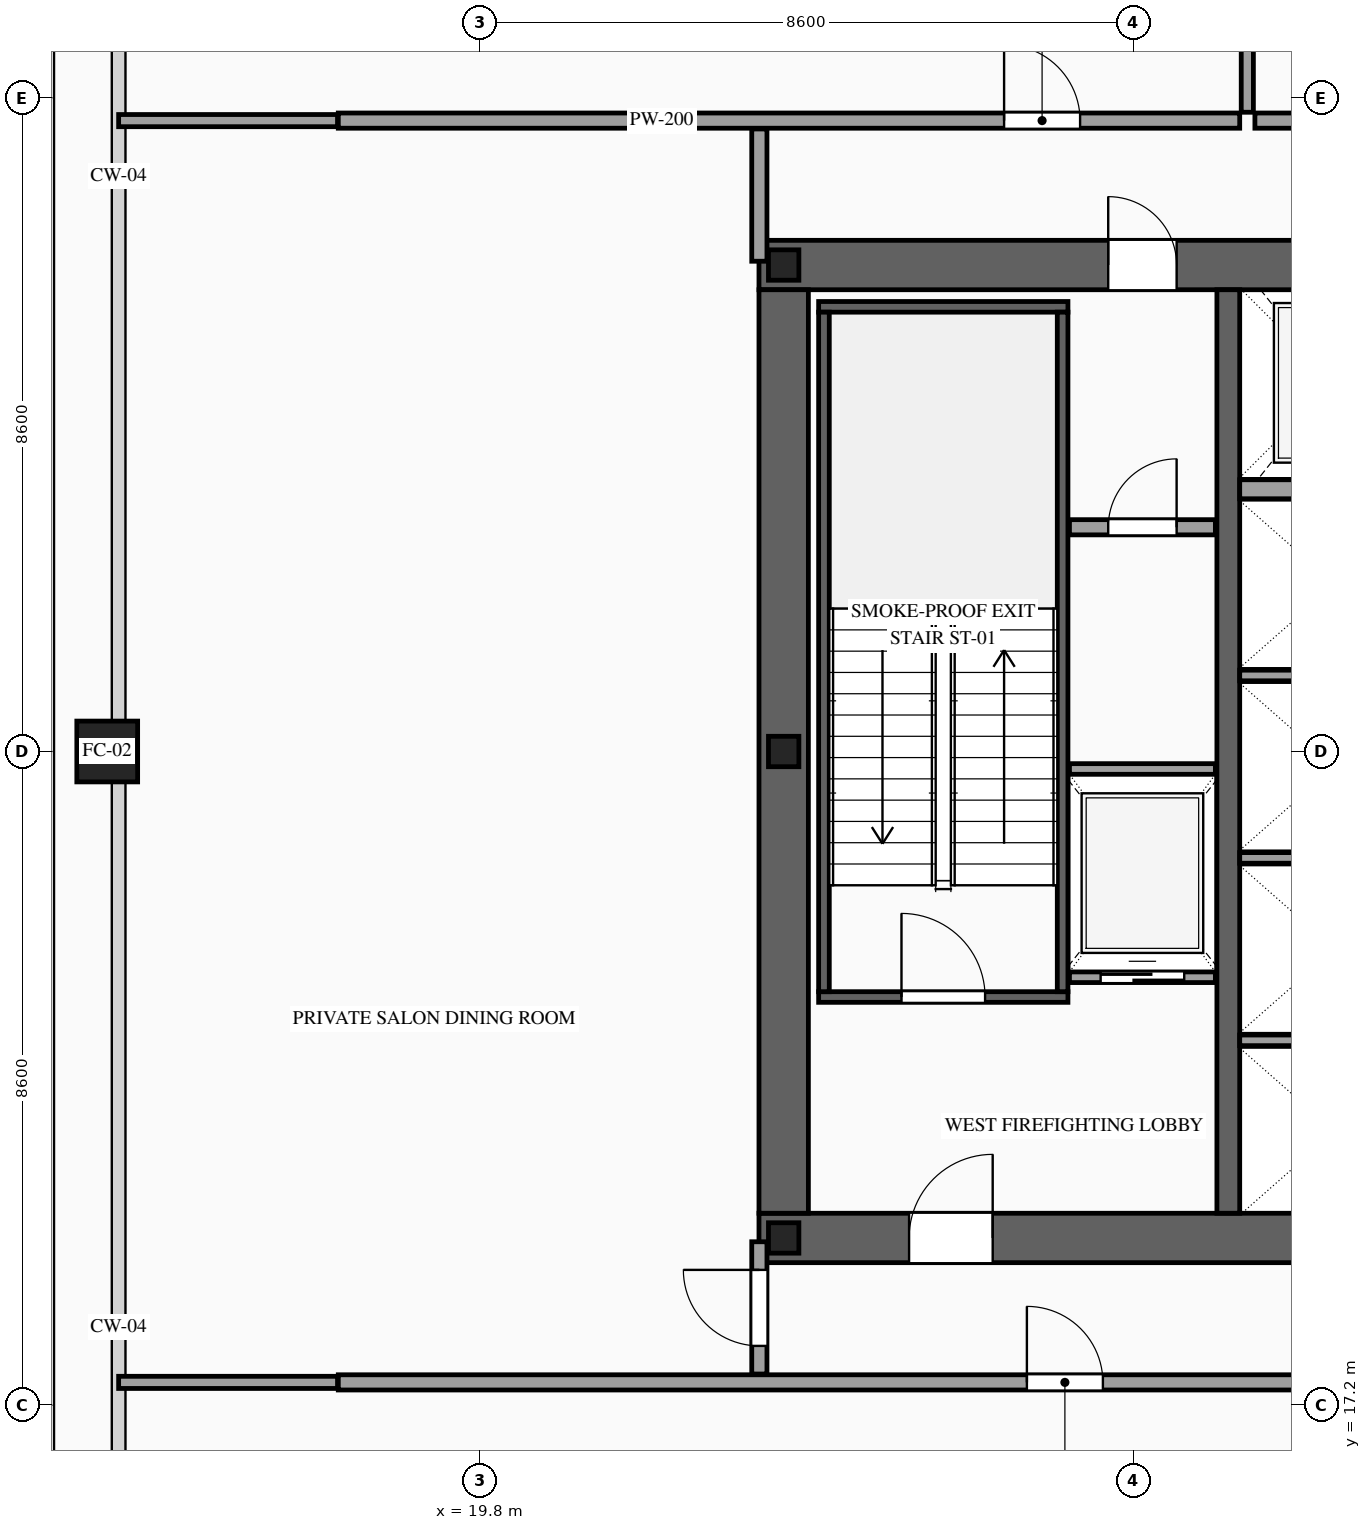
"""IFC4 building model, lengths in metres.
Left out: names, types, materials, properties, quantities, classifications, styles, units other than length and angle.
Written with IfcOpenShell. Run it as: python <this file> out.ifc"""

import sys

from ifc_helpers import new_model, si_unit, direction, frame, frame_2d, origin, origin_2d, place, context, subcontext, project, spatial, rectangle, hollow_rectangle, i_section, extrude, source, transform, mapped, element, fill, save


model = new_model("IFC4")
c1 = context("Model", 3, precision=1e-05, world=origin(), true_north=direction((0.0, 1.0)))
c2 = subcontext(c1, "Body", "Model", "MODEL_VIEW")
j1 = project(units=[si_unit("LENGTHUNIT", "METRE"), si_unit("PLANEANGLEUNIT", "RADIAN")], contexts=[c1])
p1 = place(None, origin())
s1 = spatial("IfcSite", under=j1, at=p1, CompositionType="ELEMENT")
p2 = place(p1, origin())
s2 = spatial("IfcBuilding", under=s1, at=p2, CompositionType="ELEMENT")
p3 = place(p2, frame((0.0, 0.0, 171.6)))
s3 = spatial("IfcBuildingStorey", under=s2, at=p3, CompositionType="ELEMENT", Elevation=171.6)
p4 = place(p3, frame((23.475, 19.4, 0.0), z_axis=(0.0, 0.0, 1.0), x_axis=(1.0, 0.0, 0.0)))
e1 = element("IfcWall", 1, at=p4, inside=s3, PredefinedType="SHEAR", context=c2, shape_type="SweptSolid", body=[
    extrude(rectangle(XDim=27.05, YDim=0.65, at=frame_2d((13.525, 0.0))), origin(), (0.0, 0.0, 1.0), 4.8),
])
p5 = place(p4, frame((1.975, 0.0, 0.0)))
e2 = element("IfcOpeningElement", 2, at=p5, cuts=e1, PredefinedType="OPENING", context=c2, shape_type="SweptSolid", body=[
    extrude(rectangle(XDim=1.1, YDim=2.2, at=frame_2d((0.55, 1.1))), frame((0.0, 0.34, 0.0), z_axis=(0.0, -1.0, 0.0), x_axis=(1.0, 0.0, 0.0)), (0.0, 0.0, 1.0), 0.68),
])
p6 = place(p4, frame((9.875, 0.0, 0.0)))
e3 = element("IfcOpeningElement", 3, at=p6, cuts=e1, PredefinedType="OPENING", context=c2, shape_type="SweptSolid", body=[
    extrude(rectangle(XDim=1.1, YDim=2.2, at=frame_2d((0.55, 1.1))), frame((0.0, 0.34, 0.0), z_axis=(0.0, -1.0, 0.0), x_axis=(1.0, 0.0, 0.0)), (0.0, 0.0, 1.0), 0.68),
])
p7 = place(p4, frame((23.075, 0.0, 0.0)))
e4 = element("IfcOpeningElement", 4, at=p7, cuts=e1, PredefinedType="OPENING", context=c2, shape_type="SweptSolid", body=[
    extrude(rectangle(XDim=1.1, YDim=2.2, at=frame_2d((0.55, 1.1))), frame((0.0, 0.34, 0.0), z_axis=(0.0, -1.0, 0.0), x_axis=(1.0, 0.0, 0.0)), (0.0, 0.0, 1.0), 0.68),
])
p8 = place(p4, frame((19.695, 0.0, 0.0)))
e5 = element("IfcOpeningElement", 5, at=p8, cuts=e1, PredefinedType="OPENING", context=c2, shape_type="SweptSolid", body=[
    extrude(rectangle(XDim=0.9, YDim=2.15, at=frame_2d((0.45, 1.075))), frame((0.0, 0.34, 0.0), z_axis=(0.0, -1.0, 0.0), x_axis=(1.0, 0.0, 0.0)), (0.0, 0.0, 1.0), 0.68),
])
p9 = place(p4, frame((18.255, 0.0, 0.0)))
e6 = element("IfcOpeningElement", 6, at=p9, cuts=e1, PredefinedType="OPENING", context=c2, shape_type="SweptSolid", body=[
    extrude(rectangle(XDim=0.9, YDim=2.15, at=frame_2d((0.45, 1.075))), frame((0.0, 0.34, 0.0), z_axis=(0.0, -1.0, 0.0), x_axis=(1.0, 0.0, 0.0)), (0.0, 0.0, 1.0), 0.68),
])
p10 = place(p3, frame((23.475, 32.2, 0.0), z_axis=(0.0, 0.0, 1.0), x_axis=(1.0, 0.0, 0.0)))
e7 = element("IfcWall", 7, at=p10, inside=s3, PredefinedType="SHEAR", context=c2, shape_type="SweptSolid", body=[
    extrude(rectangle(XDim=27.05, YDim=0.65, at=frame_2d((13.525, 0.0))), origin(), (0.0, 0.0, 1.0), 4.8),
])
p11 = place(p10, frame((4.595, 0.0, 0.0)))
e8 = element("IfcOpeningElement", 8, at=p11, cuts=e7, PredefinedType="OPENING", context=c2, shape_type="SweptSolid", body=[
    extrude(rectangle(XDim=0.9, YDim=2.15, at=frame_2d((0.45, 1.075))), frame((0.0, 0.34, 0.0), z_axis=(0.0, -1.0, 0.0), x_axis=(1.0, 0.0, 0.0)), (0.0, 0.0, 1.0), 0.68),
])
p12 = place(p10, frame((9.875, 0.0, 0.0)))
e9 = element("IfcOpeningElement", 9, at=p12, cuts=e7, PredefinedType="OPENING", context=c2, shape_type="SweptSolid", body=[
    extrude(rectangle(XDim=1.1, YDim=2.2, at=frame_2d((0.55, 1.1))), frame((0.0, 0.34, 0.0), z_axis=(0.0, -1.0, 0.0), x_axis=(1.0, 0.0, 0.0)), (0.0, 0.0, 1.0), 0.68),
])
p13 = place(p10, frame((15.725, 0.0, 0.0)))
e10 = element("IfcOpeningElement", 10, at=p13, cuts=e7, PredefinedType="OPENING", context=c2, shape_type="SweptSolid", body=[
    extrude(rectangle(XDim=1.1, YDim=2.2, at=frame_2d((0.55, 1.1))), frame((0.0, 0.34, 0.0), z_axis=(0.0, -1.0, 0.0), x_axis=(1.0, 0.0, 0.0)), (0.0, 0.0, 1.0), 0.68),
])
m1 = source(origin(), c2, "Body", "SweptSolid", [
    extrude(rectangle(XDim=12.15, YDim=0.65, at=frame_2d((6.075, 0.0))), origin(), (0.0, 0.0, 1.0), 4.8),
])
p14 = place(p3, frame((23.8, 19.725, 0.0), z_axis=(0.0, 0.0, 1.0), x_axis=(0.0, 1.0, 0.0)))
e11 = element("IfcWall", 11, at=p14, inside=s3, PredefinedType="SHEAR", context=c2, shape_type="MappedRepresentation", body=[
    mapped(m1, transform((0.0, 0.0, 0.0), scale=1.0)),
])
m2 = source(origin(), c2, "Body", "SweptSolid", [
    extrude(rectangle(XDim=12.15, YDim=0.3, at=frame_2d((6.075, 0.0))), origin(), (0.0, 0.0, 1.0), 4.8),
])
p15 = place(p3, frame((29.65, 19.725, 0.0), z_axis=(0.0, 0.0, 1.0), x_axis=(0.0, 1.0, 0.0)))
e12 = element("IfcWall", 12, at=p15, inside=s3, PredefinedType="SOLIDWALL", context=c2, shape_type="MappedRepresentation", body=[
    mapped(m2, transform((0.0, 0.0, 0.0), scale=1.0)),
])
m3 = source(origin(), c2, "Body", "SweptSolid", [
    extrude(i_section(OverallWidth=0.4, OverallDepth=0.4, WebThickness=0.013, FlangeThickness=0.021, at=origin_2d()), origin(), (0.0, 0.0, 1.0), 4.8),
])
for number, where, z_axis, x_axis in (
    (13, (23.8, 19.4, 0.0), (0.0, 0.0, 1.0), (1.0, 0.0, 0.0)),
    (14, (23.8, 25.8, 0.0), (0.0, 0.0, 1.0), (1.0, 0.0, 0.0)),
    (15, (23.8, 32.2, 0.0), (0.0, 0.0, 1.0), (1.0, 0.0, 0.0)),
):
    element("IfcColumn", number, at=place(p3, frame(where, z_axis=z_axis, x_axis=x_axis)), inside=s3, PredefinedType="COLUMN", context=c2, shape_type="MappedRepresentation", body=[
        mapped(m3, transform((0.0, 0.0, 0.0), scale=1.0)),
    ])
m4 = source(origin(), c2, "Body", "SweptSolid", [
    extrude(hollow_rectangle(XDim=0.8, YDim=0.8, WallThickness=0.036, at=origin_2d()), origin(), (0.0, 0.0, 1.0), 4.8),
])
p16 = place(p3, frame((14.9, 25.8, 0.0), z_axis=(0.0, 0.0, 1.0), x_axis=(1.0, 0.0, 0.0)))
e16 = element("IfcColumn", 16, at=p16, inside=s3, PredefinedType="COLUMN", context=c2, shape_type="MappedRepresentation", body=[
    mapped(m4, transform((0.0, 0.0, 0.0), scale=1.0)),
])
p17 = place(p3, frame((27.56, 22.83, 0.0), z_axis=(0.0, 0.0, 1.0), x_axis=(1.0, 0.0, 0.0)))
e17 = element("IfcWall", 17, at=p17, inside=s3, PredefinedType="SOLIDWALL", context=c2, shape_type="SweptSolid", body=[
    extrude(rectangle(XDim=1.92, YDim=0.14, at=frame_2d((0.96, 0.0))), origin(), (0.0, 0.0, 1.0), 4.52),
])
p18 = place(p17, frame((0.41, 0.0, 0.0)))
e18 = element("IfcOpeningElement", 18, at=p18, cuts=e17, PredefinedType="OPENING", context=c2, shape_type="SweptSolid", body=[
    extrude(rectangle(XDim=1.1, YDim=2.2, at=frame_2d((0.55, 1.1))), frame((0.0, 0.085, 0.0), z_axis=(0.0, -1.0, 0.0), x_axis=(1.0, 0.0, 0.0)), (0.0, 0.0, 1.0), 0.17),
])
m5 = source(origin(), c2, "Body", "SweptSolid", [
    extrude(rectangle(XDim=1.92, YDim=0.14, at=frame_2d((0.96, 0.0))), origin(), (0.0, 0.0, 1.0), 4.52),
])
p19 = place(p3, frame((27.56, 25.57, 0.0), z_axis=(0.0, 0.0, 1.0), x_axis=(1.0, 0.0, 0.0)))
e19 = element("IfcWall", 19, at=p19, inside=s3, PredefinedType="SOLIDWALL", context=c2, shape_type="MappedRepresentation", body=[
    mapped(m5, transform((0.0, 0.0, 0.0), scale=1.0)),
])
m6 = source(origin(), c2, "Body", "SweptSolid", [
    extrude(rectangle(XDim=2.5, YDim=0.14, at=frame_2d((1.25, 0.0))), origin(), (0.0, 0.0, 1.0), 4.52),
])
for number, where, z_axis, x_axis in (
    (20, (29.8, 22.0, 0.0), (0.0, 0.0, 1.0), (1.0, 0.0, 0.0)),
    (21, (29.8, 24.4, 0.0), (0.0, 0.0, 1.0), (1.0, 0.0, 0.0)),
    (22, (29.8, 26.8, 0.0), (0.0, 0.0, 1.0), (1.0, 0.0, 0.0)),
):
    element("IfcWall", number, at=place(p3, frame(where, z_axis=z_axis, x_axis=x_axis)), inside=s3, PredefinedType="SOLIDWALL", context=c2, shape_type="MappedRepresentation", body=[
        mapped(m6, transform((0.0, 0.0, 0.0), scale=1.0)),
    ])
m7 = source(origin(), c2, "Body", "SweptSolid", [
    extrude(rectangle(XDim=2.5, YDim=0.25, at=frame_2d((1.25, 0.0))), origin(), (0.0, 0.0, 1.0), 4.52),
])
p20 = place(p3, frame((29.8, 29.25, 0.0), z_axis=(0.0, 0.0, 1.0), x_axis=(1.0, 0.0, 0.0)))
e23 = element("IfcWall", 23, at=p20, inside=s3, PredefinedType="SOLIDWALL", context=c2, shape_type="MappedRepresentation", body=[
    mapped(m7, transform((0.0, 0.0, 0.0), scale=1.0)),
])
p21 = place(p3, frame((24.26, 22.57, 0.0), z_axis=(0.0, 0.0, 1.0), x_axis=(1.0, 0.0, 0.0)))
e24 = element("IfcWall", 24, at=p21, inside=s3, PredefinedType="SOLIDWALL", context=c2, shape_type="SweptSolid", body=[
    extrude(rectangle(XDim=3.28, YDim=0.14, at=frame_2d((1.64, 0.0))), origin(), (0.0, 0.0, 1.0), 4.52),
])
p22 = place(p21, frame((1.09, 0.0, 0.0)))
e25 = element("IfcOpeningElement", 25, at=p22, cuts=e24, PredefinedType="OPENING", context=c2, shape_type="SweptSolid", body=[
    extrude(rectangle(XDim=1.1, YDim=2.2, at=frame_2d((0.55, 1.1))), frame((0.0, 0.085, 0.0), z_axis=(0.0, -1.0, 0.0), x_axis=(1.0, 0.0, 0.0)), (0.0, 0.0, 1.0), 0.17),
])
m8 = source(origin(), c2, "Body", "SweptSolid", [
    extrude(rectangle(XDim=3.28, YDim=0.14, at=frame_2d((1.64, 0.0))), origin(), (0.0, 0.0, 1.0), 4.52),
])
p23 = place(p3, frame((24.26, 31.65, 0.0), z_axis=(0.0, 0.0, 1.0), x_axis=(1.0, 0.0, 0.0)))
e26 = element("IfcWall", 26, at=p23, inside=s3, PredefinedType="SOLIDWALL", context=c2, shape_type="MappedRepresentation", body=[
    mapped(m8, transform((0.0, 0.0, 0.0), scale=1.0)),
])
m9 = source(origin(), c2, "Body", "SweptSolid", [
    extrude(rectangle(XDim=8.94, YDim=0.14, at=frame_2d((4.47, 0.0))), origin(), (0.0, 0.0, 1.0), 4.52),
])
for number, where, z_axis, x_axis in (
    (27, (24.33, 22.64, 0.0), (0.0, 0.0, 1.0), (0.0, 1.0, 0.0)),
    (28, (27.47, 22.64, 0.0), (0.0, 0.0, 1.0), (0.0, 1.0, 0.0)),
):
    element("IfcWall", number, at=place(p3, frame(where, z_axis=z_axis, x_axis=x_axis)), inside=s3, PredefinedType="SOLIDWALL", context=c2, shape_type="MappedRepresentation", body=[
        mapped(m9, transform((0.0, 0.0, 0.0), scale=1.0)),
    ])
p24 = place(p3, frame((27.56, 28.75, 0.0), z_axis=(0.0, 0.0, 1.0), x_axis=(1.0, 0.0, 0.0)))
e29 = element("IfcWall", 29, at=p24, inside=s3, PredefinedType="PARTITIONING", context=c2, shape_type="SweptSolid", body=[
    extrude(rectangle(XDim=1.92, YDim=0.2, at=frame_2d((0.96, 0.0))), origin(), (0.0, 0.0, 1.0), 4.52),
])
p25 = place(p24, frame((0.51, 0.0, 0.0)))
e30 = element("IfcOpeningElement", 30, at=p25, cuts=e29, PredefinedType="OPENING", context=c2, shape_type="SweptSolid", body=[
    extrude(rectangle(XDim=0.9, YDim=2.15, at=frame_2d((0.45, 1.075))), frame((0.0, 0.115, 0.0), z_axis=(0.0, -1.0, 0.0), x_axis=(1.0, 0.0, 0.0)), (0.0, 0.0, 1.0), 0.23),
])
p26 = place(p3, frame((17.94, 17.5, 0.0), z_axis=(0.0, 0.0, 1.0), x_axis=(1.0, 0.0, 0.0)))
e31 = element("IfcWall", 31, at=p26, inside=s3, PredefinedType="PARTITIONING", context=c2, shape_type="SweptSolid", body=[
    extrude(rectangle(XDim=13.86, YDim=0.2, at=frame_2d((6.93, 0.0))), origin(), (0.0, 0.0, 1.0), 4.52),
])
p27 = place(p26, frame((9.06, 0.0, 0.0)))
e32 = element("IfcOpeningElement", 32, at=p27, cuts=e31, PredefinedType="OPENING", context=c2, shape_type="SweptSolid", body=[
    extrude(rectangle(XDim=1.0, YDim=2.2, at=frame_2d((0.5, 1.1))), frame((0.0, 0.115, 0.0), z_axis=(0.0, -1.0, 0.0), x_axis=(1.0, 0.0, 0.0)), (0.0, 0.0, 1.0), 0.23),
])
p28 = place(p3, frame((23.48, 17.61, 0.0), z_axis=(0.0, 0.0, 1.0), x_axis=(0.0, 1.0, 0.0)))
e33 = element("IfcWall", 33, at=p28, inside=s3, PredefinedType="PARTITIONING", context=c2, shape_type="SweptSolid", body=[
    extrude(rectangle(XDim=1.74, YDim=0.2, at=frame_2d((0.87, 0.0))), origin(), (0.0, 0.0, 1.0), 4.52),
])
p29 = place(p28, frame((0.37, 0.0, 0.0)))
e34 = element("IfcOpeningElement", 34, at=p29, cuts=e33, PredefinedType="OPENING", context=c2, shape_type="SweptSolid", body=[
    extrude(rectangle(XDim=1.0, YDim=2.2, at=frame_2d((0.5, 1.1))), frame((0.0, 0.115, 0.0), z_axis=(0.0, -1.0, 0.0), x_axis=(1.0, 0.0, 0.0)), (0.0, 0.0, 1.0), 0.23),
])
m10 = source(origin(), c2, "Body", "SweptSolid", [
    extrude(rectangle(XDim=1.74, YDim=0.2, at=frame_2d((0.87, 0.0))), origin(), (0.0, 0.0, 1.0), 4.52),
])
p30 = place(p3, frame((23.48, 32.25, 0.0), z_axis=(0.0, 0.0, 1.0), x_axis=(0.0, 1.0, 0.0)))
e35 = element("IfcWall", 35, at=p30, inside=s3, PredefinedType="PARTITIONING", context=c2, shape_type="MappedRepresentation", body=[
    mapped(m10, transform((0.0, 0.0, 0.0), scale=1.0)),
])
m11 = source(origin(), c2, "Body", "SweptSolid", [
    extrude(rectangle(XDim=2.88, YDim=0.16, at=frame_2d((1.44, 0.0))), origin(), (0.0, 0.0, 1.0), 4.52),
])
for number, where, z_axis, x_axis in (
    (36, (15.05, 17.5, 0.0), (0.0, 0.0, 1.0), (1.0, 0.0, 0.0)),
    (37, (15.05, 34.1, 0.0), (0.0, 0.0, 1.0), (1.0, 0.0, 0.0)),
):
    element("IfcWall", number, at=place(p3, frame(where, z_axis=z_axis, x_axis=x_axis)), inside=s3, PredefinedType="PARTITIONING", context=c2, shape_type="MappedRepresentation", body=[
        mapped(m11, transform((0.0, 0.0, 0.0), scale=1.0)),
    ])
p31 = place(p3, frame((17.94, 34.1, 0.0), z_axis=(0.0, 0.0, 1.0), x_axis=(1.0, 0.0, 0.0)))
e38 = element("IfcWall", 38, at=p31, inside=s3, PredefinedType="PARTITIONING", context=c2, shape_type="SweptSolid", body=[
    extrude(rectangle(XDim=11.86, YDim=0.2, at=frame_2d((5.93, 0.0))), origin(), (0.0, 0.0, 1.0), 4.52),
])
p32 = place(p31, frame((8.76, 0.0, 0.0)))
e39 = element("IfcOpeningElement", 39, at=p32, cuts=e38, PredefinedType="OPENING", context=c2, shape_type="SweptSolid", body=[
    extrude(rectangle(XDim=1.0, YDim=2.2, at=frame_2d((0.5, 1.1))), frame((0.0, 0.115, 0.0), z_axis=(0.0, -1.0, 0.0), x_axis=(1.0, 0.0, 0.0)), (0.0, 0.0, 1.0), 0.23),
])
m12 = source(origin(), c2, "Body", "SweptSolid", [
    extrude(rectangle(XDim=13.54, YDim=0.16, at=frame_2d((6.77, 0.0))), origin(), (0.0, 0.0, 1.0), 4.52),
])
p33 = place(p3, frame((29.9, 34.21, 0.0), z_axis=(0.0, 0.0, 1.0), x_axis=(0.0, 1.0, 0.0)))
e40 = element("IfcWall", 40, at=p33, inside=s3, PredefinedType="PARTITIONING", context=c2, shape_type="MappedRepresentation", body=[
    mapped(m12, transform((0.0, 0.0, 0.0), scale=1.0)),
])
p34 = place(p3, frame((30.0, 34.1, 0.0), z_axis=(0.0, 0.0, 1.0), x_axis=(1.0, 0.0, 0.0)))
e41 = element("IfcWall", 41, at=p34, inside=s3, PredefinedType="PARTITIONING", context=c2, shape_type="SweptSolid", body=[
    extrude(rectangle(XDim=6.8, YDim=0.2, at=frame_2d((3.4, 0.0))), origin(), (0.0, 0.0, 1.0), 4.52),
])
p35 = place(p34, frame((2.9, 0.0, 0.0)))
e42 = element("IfcOpeningElement", 42, at=p35, cuts=e41, PredefinedType="OPENING", context=c2, shape_type="SweptSolid", body=[
    extrude(rectangle(XDim=1.0, YDim=2.2, at=frame_2d((0.5, 1.1))), frame((0.0, 0.115, 0.0), z_axis=(0.0, -1.0, 0.0), x_axis=(1.0, 0.0, 0.0)), (0.0, 0.0, 1.0), 0.23),
])
m13 = source(origin(), c2, "Body", "SweptSolid", [
    extrude(rectangle(XDim=1.1, YDim=2.2, at=frame_2d((0.55, 1.1))), frame((0.0, 0.025, 0.0), z_axis=(0.0, -1.0, 0.0), x_axis=(1.0, 0.0, 0.0)), (0.0, 0.0, 1.0), 0.05),
])
p36 = place(p18, origin())
e43 = element("IfcDoor", 43, at=p36, inside=s3, OperationType="SLIDING_TO_LEFT", PredefinedType="DOOR", context=c2, shape_type="MappedRepresentation", body=[
    mapped(m13, transform((0.0, 0.0, 0.0), scale=1.0)),
])
fill(e18, e43)
m14 = source(origin(), c2, "Body", "SweptSolid", [
    extrude(rectangle(XDim=1.1, YDim=2.2, at=frame_2d((0.55, 1.1))), frame((0.0, 0.025, 0.0), z_axis=(0.0, -1.0, 0.0), x_axis=(1.0, 0.0, 0.0)), (0.0, 0.0, 1.0), 0.05),
])
p37 = place(p22, origin())
e44 = element("IfcDoor", 44, at=p37, inside=s3, OperationType="SINGLE_SWING_LEFT", PredefinedType="DOOR", context=c2, shape_type="MappedRepresentation", body=[
    mapped(m14, transform((0.0, 0.0, 0.0), scale=1.0)),
])
fill(e25, e44)
p38 = place(p5, origin())
e45 = element("IfcDoor", 45, at=p38, inside=s3, OperationType="SINGLE_SWING_RIGHT", PredefinedType="DOOR", context=c2, shape_type="MappedRepresentation", body=[
    mapped(m14, transform((0.0, 0.0, 0.0), scale=1.0)),
])
fill(e2, e45)
m15 = source(origin(), c2, "Body", "SweptSolid", [
    extrude(rectangle(XDim=0.9, YDim=2.15, at=frame_2d((0.45, 1.075))), frame((0.0, 0.025, 0.0), z_axis=(0.0, -1.0, 0.0), x_axis=(1.0, 0.0, 0.0)), (0.0, 0.0, 1.0), 0.05),
])
p39 = place(p11, origin())
e46 = element("IfcDoor", 46, at=p39, inside=s3, OperationType="SINGLE_SWING_LEFT", PredefinedType="DOOR", context=c2, shape_type="MappedRepresentation", body=[
    mapped(m15, transform((0.0, 0.0, 0.0), scale=1.0)),
])
fill(e8, e46)
p40 = place(p25, origin())
e47 = element("IfcDoor", 47, at=p40, inside=s3, OperationType="SINGLE_SWING_RIGHT", PredefinedType="DOOR", context=c2, shape_type="MappedRepresentation", body=[
    mapped(m15, transform((0.0, 0.0, 0.0), scale=1.0)),
])
fill(e30, e47)
m16 = source(origin(), c2, "Body", "SweptSolid", [
    extrude(rectangle(XDim=1.0, YDim=2.2, at=frame_2d((0.5, 1.1))), frame((0.0, 0.025, 0.0), z_axis=(0.0, -1.0, 0.0), x_axis=(1.0, 0.0, 0.0)), (0.0, 0.0, 1.0), 0.05),
])
p41 = place(p27, origin())
e48 = element("IfcDoor", 48, at=p41, inside=s3, OperationType="SINGLE_SWING_LEFT", PredefinedType="DOOR", context=c2, shape_type="MappedRepresentation", body=[
    mapped(m16, transform((0.0, 0.0, 0.0), scale=1.0)),
])
fill(e32, e48)
p42 = place(p29, origin())
e49 = element("IfcDoor", 49, at=p42, inside=s3, OperationType="SINGLE_SWING_RIGHT", PredefinedType="DOOR", context=c2, shape_type="MappedRepresentation", body=[
    mapped(m16, transform((0.0, 0.0, 0.0), scale=1.0)),
])
fill(e34, e49)
p43 = place(p32, origin())
e50 = element("IfcDoor", 50, at=p43, inside=s3, OperationType="SINGLE_SWING_LEFT", PredefinedType="DOOR", context=c2, shape_type="MappedRepresentation", body=[
    mapped(m16, transform((0.0, 0.0, 0.0), scale=1.0)),
])
fill(e39, e50)
save(model, sys.argv[1])
